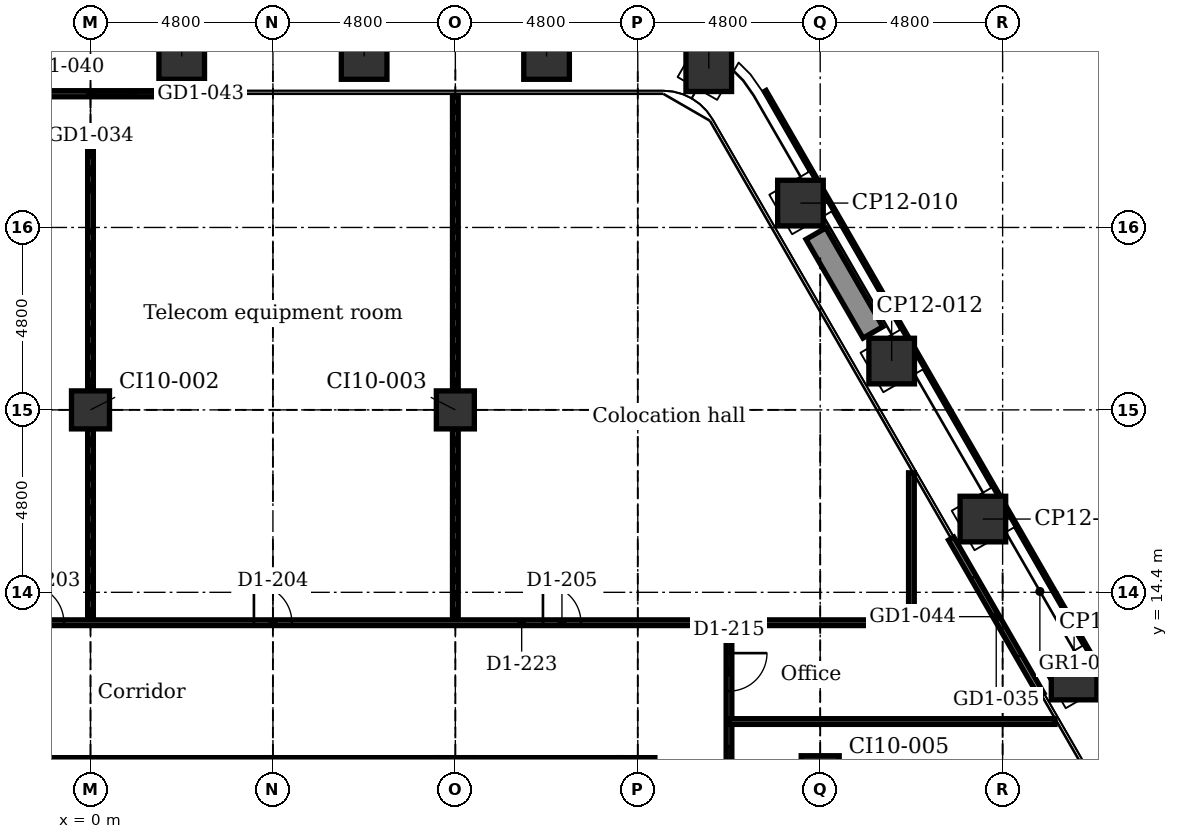
"""IFC4 building model, lengths in metres.
Left out: names, types, materials, properties, quantities, classifications, styles, units other than length and angle.
Written with IfcOpenShell. Run it as: python <this file> out.ifc"""

import sys

from ifc_helpers import new_model, si_unit, direction, frame, frame_2d, origin, origin_2d, place, context, subcontext, project, spatial, rectangle, extrude, element, fill, save


model = new_model("IFC4")
c1 = context("Model", 3, precision=1e-05, world=origin(), true_north=direction((0.0, 1.0)))
c2 = subcontext(c1, "Body", "Model", "MODEL_VIEW")
j1 = project(units=[si_unit("LENGTHUNIT", "METRE"), si_unit("PLANEANGLEUNIT", "RADIAN")], contexts=[c1])
p1 = place(None, origin())
s1 = spatial("IfcSite", under=j1, at=p1, CompositionType="ELEMENT")
p2 = place(p1, origin())
s2 = spatial("IfcBuilding", under=s1, at=p2, CompositionType="ELEMENT")
p3 = place(p2, frame((0.0, 0.0, 77.9)))
s3 = spatial("IfcBuildingStorey", under=s2, at=p3, CompositionType="ELEMENT", Elevation=77.9)
for number, where, z_axis, x_axis in (
    (1, (2.4, 28.499, -0.2), (0.0, 0.0, 1.0), (1.0, 0.0, 0.0)),
    (2, (7.2, 28.499, -0.2), (0.0, 0.0, 1.0), (1.0, 0.0, 0.0)),
    (3, (12.0, 28.499, -0.2), (0.0, 0.0, 1.0), (1.0, 0.0, 0.0)),
    (4, (16.268, 28.177, -0.2), (0.0, 0.0, 1.0), (0.5, 0.866, 0.0)),
    (5, (18.68, 24.642, -0.2), (0.0, 0.0, 1.0), (0.866, 0.5, 0.0)),
    (6, (21.08, 20.485, -0.2), (0.0, 0.0, 1.0), (0.866, 0.5, 0.0)),
    (7, (23.48, 16.328, -0.2), (0.0, 0.0, 1.0), (0.866, 0.5, 0.0)),
    (8, (25.88, 12.171, -0.2), (0.0, 0.0, 1.0), (0.866, 0.5, 0.0)),
):
    element("IfcColumn", number, at=place(p3, frame(where, z_axis=z_axis, x_axis=x_axis)), inside=s3, PredefinedType="COLUMN", context=c2, shape_type="SweptSolid", body=[
        extrude(rectangle(XDim=1.2, YDim=1.2, at=origin_2d()), origin(), (0.0, 0.0, 1.0), 4.5),
    ])
for number, where, z_axis, x_axis in (
    (9, (0.0, 19.2, -0.2), (0.0, 0.0, 1.0), (1.0, 0.0, 0.0)),
    (10, (9.6, 19.2, -0.2), (0.0, 0.0, 1.0), (1.0, 0.0, 0.0)),
    (11, (19.2, 9.6, -0.2), (0.0, 0.0, 1.0), (1.0, 0.0, 0.0)),
):
    element("IfcColumn", number, at=place(p3, frame(where, z_axis=z_axis, x_axis=x_axis)), inside=s3, PredefinedType="COLUMN", context=c2, shape_type="SweptSolid", body=[
        extrude(rectangle(XDim=1.0, YDim=1.0, at=origin_2d()), origin(), (0.0, 0.0, 1.0), 4.5),
    ])
p4 = place(p3, frame((-5.25, 9.6, -0.2), z_axis=(0.0, 0.0, 1.0), x_axis=(1.0, 0.0, 0.0)))
e12 = element("IfcWall", 12, at=p4, inside=s3, PredefinedType="SHEAR", context=c2, shape_type="SweptSolid", body=[
    extrude(rectangle(XDim=14.4, YDim=0.9, at=frame_2d((7.2, 0.0))), origin(), (0.0, 0.0, 1.0), 4.5),
])
p5 = place(p4, frame((9.35, 0.0, 0.2)))
e13 = element("IfcOpeningElement", 13, at=p5, cuts=e12, PredefinedType="OPENING", context=c2, shape_type="SweptSolid", body=[
    extrude(rectangle(XDim=1.4, YDim=2.1, at=frame_2d((0.7, 1.05))), frame((0.0, 0.46, 0.0), z_axis=(0.0, -1.0, 0.0), x_axis=(1.0, 0.0, 0.0)), (0.0, 0.0, 1.0), 0.92),
])
p6 = place(p3, frame((10.05, 9.6, -0.2), z_axis=(0.0, 0.0, 1.0), x_axis=(1.0, 0.0, 0.0)))
e14 = element("IfcWall", 14, at=p6, inside=s3, PredefinedType="SHEAR", context=c2, shape_type="SweptSolid", body=[
    extrude(rectangle(XDim=3.9, YDim=0.9, at=frame_2d((1.95, 0.0))), origin(), (0.0, 0.0, 1.0), 4.5),
])
p7 = place(p6, frame((0.05, 0.0, 0.2)))
e15 = element("IfcOpeningElement", 15, at=p7, cuts=e14, PredefinedType="OPENING", context=c2, shape_type="SweptSolid", body=[
    extrude(rectangle(XDim=0.9, YDim=2.1, at=frame_2d((0.45, 1.05))), frame((0.0, 0.46, 0.0), z_axis=(0.0, -1.0, 0.0), x_axis=(1.0, 0.0, 0.0)), (0.0, 0.0, 1.0), 0.92),
])
p8 = place(p6, frame((1.5, 0.0, 0.2)))
e16 = element("IfcOpeningElement", 16, at=p8, cuts=e14, PredefinedType="OPENING", context=c2, shape_type="SweptSolid", body=[
    extrude(rectangle(XDim=0.9, YDim=2.1, at=frame_2d((0.45, 1.05))), frame((0.0, 0.46, 0.0), z_axis=(0.0, -1.0, 0.0), x_axis=(1.0, 0.0, 0.0)), (0.0, 0.0, 1.0), 0.92),
])
p9 = place(p6, frame((2.95, 0.0, 0.2)))
e17 = element("IfcOpeningElement", 17, at=p9, cuts=e14, PredefinedType="OPENING", context=c2, shape_type="SweptSolid", body=[
    extrude(rectangle(XDim=0.9, YDim=2.1, at=frame_2d((0.45, 1.05))), frame((0.0, 0.46, 0.0), z_axis=(0.0, -1.0, 0.0), x_axis=(1.0, 0.0, 0.0)), (0.0, 0.0, 1.0), 0.92),
])
p10 = place(p3, frame((9.6, -10.15, -0.2), z_axis=(0.0, 0.0, 1.0), x_axis=(0.0, 1.0, 0.0)))
e18 = element("IfcWall", 18, at=p10, inside=s3, PredefinedType="SHEAR", context=c2, shape_type="SweptSolid", body=[
    extrude(rectangle(XDim=20.2, YDim=0.9, at=frame_2d((10.1, 0.0))), origin(), (0.0, 0.0, 1.0), 4.5),
])
p11 = place(p3, frame((14.4, -10.05, -0.2), z_axis=(0.0, 0.0, 1.0), x_axis=(0.0, 1.0, 0.0)))
e19 = element("IfcWall", 19, at=p11, inside=s3, PredefinedType="SHEAR", context=c2, shape_type="SweptSolid", body=[
    extrude(rectangle(XDim=20.1, YDim=0.9, at=frame_2d((10.05, 0.0))), origin(), (0.0, 0.0, 1.0), 4.5),
])
p12 = place(p11, frame((3.5, 0.0, 0.2)))
e20 = element("IfcOpeningElement", 20, at=p12, cuts=e19, PredefinedType="OPENING", context=c2, shape_type="SweptSolid", body=[
    extrude(rectangle(XDim=1.1, YDim=2.1, at=frame_2d((0.55, 1.05))), frame((0.0, 0.46, 0.0), z_axis=(0.0, -1.0, 0.0), x_axis=(1.0, 0.0, 0.0)), (0.0, 0.0, 1.0), 0.92),
])
p13 = place(p11, frame((5.9, 0.0, 0.2)))
e21 = element("IfcOpeningElement", 21, at=p13, cuts=e19, PredefinedType="OPENING", context=c2, shape_type="SweptSolid", body=[
    extrude(rectangle(XDim=1.1, YDim=2.1, at=frame_2d((0.55, 1.05))), frame((0.0, 0.46, 0.0), z_axis=(0.0, -1.0, 0.0), x_axis=(1.0, 0.0, 0.0)), (0.0, 0.0, 1.0), 0.92),
])
p14 = place(p11, frame((8.3, 0.0, 0.2)))
e22 = element("IfcOpeningElement", 22, at=p14, cuts=e19, PredefinedType="OPENING", context=c2, shape_type="SweptSolid", body=[
    extrude(rectangle(XDim=1.1, YDim=2.1, at=frame_2d((0.55, 1.05))), frame((0.0, 0.46, 0.0), z_axis=(0.0, -1.0, 0.0), x_axis=(1.0, 0.0, 0.0)), (0.0, 0.0, 1.0), 0.92),
])
p15 = place(p11, frame((10.7, 0.0, 0.2)))
e23 = element("IfcOpeningElement", 23, at=p15, cuts=e19, PredefinedType="OPENING", context=c2, shape_type="SweptSolid", body=[
    extrude(rectangle(XDim=1.1, YDim=2.1, at=frame_2d((0.55, 1.05))), frame((0.0, 0.46, 0.0), z_axis=(0.0, -1.0, 0.0), x_axis=(1.0, 0.0, 0.0)), (0.0, 0.0, 1.0), 0.92),
])
p16 = place(p3, frame((-2.37, 27.519, 0.0), z_axis=(0.0, 0.0, 1.0), x_axis=(1.0, 0.0, 0.0)))
e24 = element("IfcWall", 24, at=p16, inside=s3, PredefinedType="PARTITIONING", context=c2, shape_type="SweptSolid", body=[
    extrude(rectangle(XDim=4.74, YDim=0.16, at=frame_2d((2.37, 0.0))), origin(), (0.0, 0.0, 1.0), 4.3),
])
p17 = place(p16, frame((1.17, 0.0, 0.0)))
e25 = element("IfcOpeningElement", 25, at=p17, cuts=e24, PredefinedType="OPENING", context=c2, shape_type="SweptSolid", body=[
    extrude(rectangle(XDim=2.4, YDim=2.4, at=frame_2d((1.2, 1.2))), frame((0.0, 0.09, 0.0), z_axis=(0.0, -1.0, 0.0), x_axis=(1.0, 0.0, 0.0)), (0.0, 0.0, 1.0), 0.18),
])
p18 = place(p3, frame((22.647, 15.812, 0.0), z_axis=(0.0, 0.0, 1.0), x_axis=(0.499978080042, -0.866038058908, 0.0)))
e26 = element("IfcWall", 26, at=p18, inside=s3, PredefinedType="PARTITIONING", context=c2, shape_type="SweptSolid", body=[
    extrude(rectangle(XDim=4.74, YDim=0.16, at=frame_2d((2.37, 0.0))), origin(), (0.0, 0.0, 1.0), 4.3),
])
p19 = place(p18, frame((1.17, 0.0, 0.0)))
e27 = element("IfcOpeningElement", 27, at=p19, cuts=e26, PredefinedType="OPENING", context=c2, shape_type="SweptSolid", body=[
    extrude(rectangle(XDim=2.4, YDim=2.4, at=frame_2d((1.2, 1.2))), frame((0.0, 0.09, 0.0), z_axis=(0.0, -1.0, 0.0), x_axis=(1.0, 0.0, 0.0)), (0.0, 0.0, 1.0), 0.18),
])
p20 = place(p3, frame((19.087, 23.837, 0.0), z_axis=(0.0, 0.0, 1.0), x_axis=(0.499990139034, -0.866031096941, 0.0)))
e28 = element("IfcWall", 28, at=p20, inside=s3, PredefinedType="USERDEFINED", context=c2, shape_type="SweptSolid", body=[
    extrude(rectangle(XDim=3.0, YDim=0.6, at=frame_2d((1.5, 0.0))), origin(), (0.0, 0.0, 1.0), 0.7),
])
p21 = place(p3, frame((21.6, 13.6, 0.0), z_axis=(0.0, 0.0, 1.0), x_axis=(0.0, 1.0, 0.0)))
e29 = element("IfcWall", 29, at=p21, inside=s3, PredefinedType="PARTITIONING", context=c2, shape_type="SweptSolid", body=[
    extrude(rectangle(XDim=3.945, YDim=0.15, at=frame_2d((1.972, 0.0))), origin(), (0.0, 0.0, 1.0), 4.3),
])
p22 = place(p3, frame((16.8, 3.95, 0.0), z_axis=(0.0, 0.0, 1.0), x_axis=(0.0, 1.0, 0.0)))
e30 = element("IfcWall", 30, at=p22, inside=s3, PredefinedType="PARTITIONING", context=c2, shape_type="SweptSolid", body=[
    extrude(rectangle(XDim=9.65, YDim=0.15, at=frame_2d((4.825, 0.0))), origin(), (0.0, 0.0, 1.0), 4.3),
])
p23 = place(p22, frame((2.25, 0.0, 0.0)))
e31 = element("IfcOpeningElement", 31, at=p23, cuts=e30, PredefinedType="OPENING", context=c2, shape_type="SweptSolid", body=[
    extrude(rectangle(XDim=1.0, YDim=2.1, at=frame_2d((0.5, 1.05))), frame((0.0, 0.085, 0.0), z_axis=(0.0, -1.0, 0.0), x_axis=(1.0, 0.0, 0.0)), (0.0, 0.0, 1.0), 0.17),
])
p24 = place(p22, frame((7.85, 0.0, 0.0)))
e32 = element("IfcOpeningElement", 32, at=p24, cuts=e30, PredefinedType="OPENING", context=c2, shape_type="SweptSolid", body=[
    extrude(rectangle(XDim=1.0, YDim=2.1, at=frame_2d((0.5, 1.05))), frame((0.0, 0.085, 0.0), z_axis=(0.0, -1.0, 0.0), x_axis=(1.0, 0.0, 0.0)), (0.0, 0.0, 1.0), 0.17),
])
p25 = place(p22, frame((4.6, 0.0, 0.9)))
e33 = element("IfcOpeningElement", 33, at=p25, cuts=e30, PredefinedType="OPENING", context=c2, shape_type="SweptSolid", body=[
    extrude(rectangle(XDim=1.8, YDim=1.5, at=frame_2d((0.9, 0.75))), frame((0.0, 0.085, 0.0), z_axis=(0.0, -1.0, 0.0), x_axis=(1.0, 0.0, 0.0)), (0.0, 0.0, 1.0), 0.17),
])
p26 = place(p3, frame((9.6, 13.6, 0.0), z_axis=(0.0, 0.0, 1.0), x_axis=(0.0, 1.0, 0.0)))
e34 = element("IfcWall", 34, at=p26, inside=s3, PredefinedType="PARTITIONING", context=c2, shape_type="SweptSolid", body=[
    extrude(rectangle(XDim=5.1, YDim=0.15, at=frame_2d((2.55, 0.0))), origin(), (0.0, 0.0, 1.0), 3.843),
])
p27 = place(p3, frame((9.6, 19.7, 0.0), z_axis=(0.0, 0.0, 1.0), x_axis=(0.0, 1.0, 0.0)))
e35 = element("IfcWall", 35, at=p27, inside=s3, PredefinedType="PARTITIONING", context=c2, shape_type="SweptSolid", body=[
    extrude(rectangle(XDim=7.729, YDim=0.15, at=frame_2d((3.864, 0.0))), origin(), (0.0, 0.0, 1.0), 3.843),
])
p28 = place(p3, frame((0.0, 13.6, 0.0), z_axis=(0.0, 0.0, 1.0), x_axis=(0.0, 1.0, 0.0)))
e36 = element("IfcWall", 36, at=p28, inside=s3, PredefinedType="PARTITIONING", context=c2, shape_type="SweptSolid", body=[
    extrude(rectangle(XDim=5.1, YDim=0.15, at=frame_2d((2.55, 0.0))), origin(), (0.0, 0.0, 1.0), 3.843),
])
p29 = place(p3, frame((0.0, 19.7, 0.0), z_axis=(0.0, 0.0, 1.0), x_axis=(0.0, 1.0, 0.0)))
e37 = element("IfcWall", 37, at=p29, inside=s3, PredefinedType="PARTITIONING", context=c2, shape_type="SweptSolid", body=[
    extrude(rectangle(XDim=6.619, YDim=0.15, at=frame_2d((3.309, 0.0))), origin(), (0.0, 0.0, 1.0), 3.843),
])
p30 = place(p3, frame((16.8, 11.0, 0.0), z_axis=(0.0, 0.0, 1.0), x_axis=(1.0, 0.0, 0.0)))
e38 = element("IfcWall", 38, at=p30, inside=s3, PredefinedType="PARTITIONING", context=c2, shape_type="SweptSolid", body=[
    extrude(rectangle(XDim=8.578, YDim=0.15, at=frame_2d((4.289, 0.0))), origin(), (0.0, 0.0, 1.0), 4.3),
])
p31 = place(p3, frame((-21.6, 13.6, 0.0), z_axis=(0.0, 0.0, 1.0), x_axis=(1.0, 0.0, 0.0)))
e39 = element("IfcWall", 39, at=p31, inside=s3, PredefinedType="PARTITIONING", context=c2, shape_type="SweptSolid", body=[
    extrude(rectangle(XDim=43.2, YDim=0.15, at=frame_2d((21.6, 0.0))), origin(), (0.0, 0.0, 1.0), 4.3),
])
p32 = place(p31, frame((6.7, 0.0, 0.0)))
e40 = element("IfcOpeningElement", 40, at=p32, cuts=e39, PredefinedType="OPENING", context=c2, shape_type="SweptSolid", body=[
    extrude(rectangle(XDim=1.0, YDim=2.1, at=frame_2d((0.5, 1.05))), frame((0.0, 0.085, 0.0), z_axis=(0.0, -1.0, 0.0), x_axis=(1.0, 0.0, 0.0)), (0.0, 0.0, 1.0), 0.17),
])
p33 = place(p31, frame((10.175, 0.0, 0.0)))
e41 = element("IfcOpeningElement", 41, at=p33, cuts=e39, PredefinedType="OPENING", context=c2, shape_type="SweptSolid", body=[
    extrude(rectangle(XDim=1.0, YDim=2.1, at=frame_2d((0.5, 1.05))), frame((0.0, 0.085, 0.0), z_axis=(0.0, -1.0, 0.0), x_axis=(1.0, 0.0, 0.0)), (0.0, 0.0, 1.0), 0.17),
])
p34 = place(p31, frame((16.955, 0.0, 0.0)))
e42 = element("IfcOpeningElement", 42, at=p34, cuts=e39, PredefinedType="OPENING", context=c2, shape_type="SweptSolid", body=[
    extrude(rectangle(XDim=1.0, YDim=2.1, at=frame_2d((0.5, 1.05))), frame((0.0, 0.085, 0.0), z_axis=(0.0, -1.0, 0.0), x_axis=(1.0, 0.0, 0.0)), (0.0, 0.0, 1.0), 0.17),
])
p35 = place(p31, frame((19.9, 0.0, 0.0)))
e43 = element("IfcOpeningElement", 43, at=p35, cuts=e39, PredefinedType="OPENING", context=c2, shape_type="SweptSolid", body=[
    extrude(rectangle(XDim=1.0, YDim=2.1, at=frame_2d((0.5, 1.05))), frame((0.0, 0.085, 0.0), z_axis=(0.0, -1.0, 0.0), x_axis=(1.0, 0.0, 0.0)), (0.0, 0.0, 1.0), 0.17),
])
p36 = place(p31, frame((25.9, 0.0, 0.0)))
e44 = element("IfcOpeningElement", 44, at=p36, cuts=e39, PredefinedType="OPENING", context=c2, shape_type="SweptSolid", body=[
    extrude(rectangle(XDim=1.0, YDim=2.1, at=frame_2d((0.5, 1.05))), frame((0.0, 0.085, 0.0), z_axis=(0.0, -1.0, 0.0), x_axis=(1.0, 0.0, 0.0)), (0.0, 0.0, 1.0), 0.17),
])
p37 = place(p31, frame((33.505, 0.0, 0.0)))
e45 = element("IfcOpeningElement", 45, at=p37, cuts=e39, PredefinedType="OPENING", context=c2, shape_type="SweptSolid", body=[
    extrude(rectangle(XDim=1.0, YDim=2.1, at=frame_2d((0.5, 1.05))), frame((0.0, 0.085, 0.0), z_axis=(0.0, -1.0, 0.0), x_axis=(1.0, 0.0, 0.0)), (0.0, 0.0, 1.0), 0.17),
])
p38 = place(p17, origin())
e46 = element("IfcDoor", 46, at=p38, inside=s3, OperationType="DOUBLE_DOOR_SLIDING", PredefinedType="DOOR", context=c2, shape_type="SweptSolid", body=[
    extrude(rectangle(XDim=2.4, YDim=2.4, at=frame_2d((1.2, 1.2))), frame((0.0, 0.025, 0.0), z_axis=(0.0, -1.0, 0.0), x_axis=(1.0, 0.0, 0.0)), (0.0, 0.0, 1.0), 0.05),
])
fill(e25, e46)
p39 = place(p19, origin())
e47 = element("IfcDoor", 47, at=p39, inside=s3, OperationType="DOUBLE_DOOR_SLIDING", PredefinedType="DOOR", context=c2, shape_type="SweptSolid", body=[
    extrude(rectangle(XDim=2.4, YDim=2.4, at=frame_2d((1.2, 1.2))), frame((0.0, 0.025, 0.0), z_axis=(0.0, -1.0, 0.0), x_axis=(1.0, 0.0, 0.0)), (0.0, 0.0, 1.0), 0.05),
])
fill(e27, e47)
p40 = place(p35, origin())
e48 = element("IfcDoor", 48, at=p40, inside=s3, OperationType="SINGLE_SWING_LEFT", PredefinedType="DOOR", context=c2, shape_type="SweptSolid", body=[
    extrude(rectangle(XDim=1.0, YDim=2.1, at=frame_2d((0.5, 1.05))), frame((0.0, 0.025, 0.0), z_axis=(0.0, -1.0, 0.0), x_axis=(1.0, 0.0, 0.0)), (0.0, 0.0, 1.0), 0.05),
])
fill(e43, e48)
p41 = place(p36, origin())
e49 = element("IfcDoor", 49, at=p41, inside=s3, OperationType="SINGLE_SWING_LEFT", PredefinedType="DOOR", context=c2, shape_type="SweptSolid", body=[
    extrude(rectangle(XDim=1.0, YDim=2.1, at=frame_2d((0.5, 1.05))), frame((0.0, 0.025, 0.0), z_axis=(0.0, -1.0, 0.0), x_axis=(1.0, 0.0, 0.0)), (0.0, 0.0, 1.0), 0.05),
])
fill(e44, e49)
p42 = place(p37, origin())
e50 = element("IfcDoor", 50, at=p42, inside=s3, OperationType="SINGLE_SWING_LEFT", PredefinedType="DOOR", context=c2, shape_type="SweptSolid", body=[
    extrude(rectangle(XDim=1.0, YDim=2.1, at=frame_2d((0.5, 1.05))), frame((0.0, 0.025, 0.0), z_axis=(0.0, -1.0, 0.0), x_axis=(1.0, 0.0, 0.0)), (0.0, 0.0, 1.0), 0.05),
])
fill(e45, e50)
p43 = place(p24, frame((1.0, 0.0, 0.0), z_axis=(0.0, 0.0, 1.0), x_axis=(-1.0, 0.0, 0.0)))
e51 = element("IfcDoor", 51, at=p43, inside=s3, OperationType="SINGLE_SWING_RIGHT", PredefinedType="DOOR", context=c2, shape_type="SweptSolid", body=[
    extrude(rectangle(XDim=1.0, YDim=2.1, at=frame_2d((0.5, 1.05))), frame((0.0, 0.025, 0.0), z_axis=(0.0, -1.0, 0.0), x_axis=(1.0, 0.0, 0.0)), (0.0, 0.0, 1.0), 0.05),
])
fill(e32, e51)
p44 = place(p25, origin())
e52 = element("IfcWindow", 52, at=p44, inside=s3, PartitioningType="SINGLE_PANEL", PredefinedType="WINDOW", context=c2, shape_type="SweptSolid", body=[
    extrude(rectangle(XDim=1.8, YDim=1.5, at=frame_2d((0.9, 0.75))), frame((0.0, 0.03, 0.0), z_axis=(0.0, -1.0, 0.0), x_axis=(1.0, 0.0, 0.0)), (0.0, 0.0, 1.0), 0.06),
])
fill(e33, e52)
save(model, sys.argv[1])
